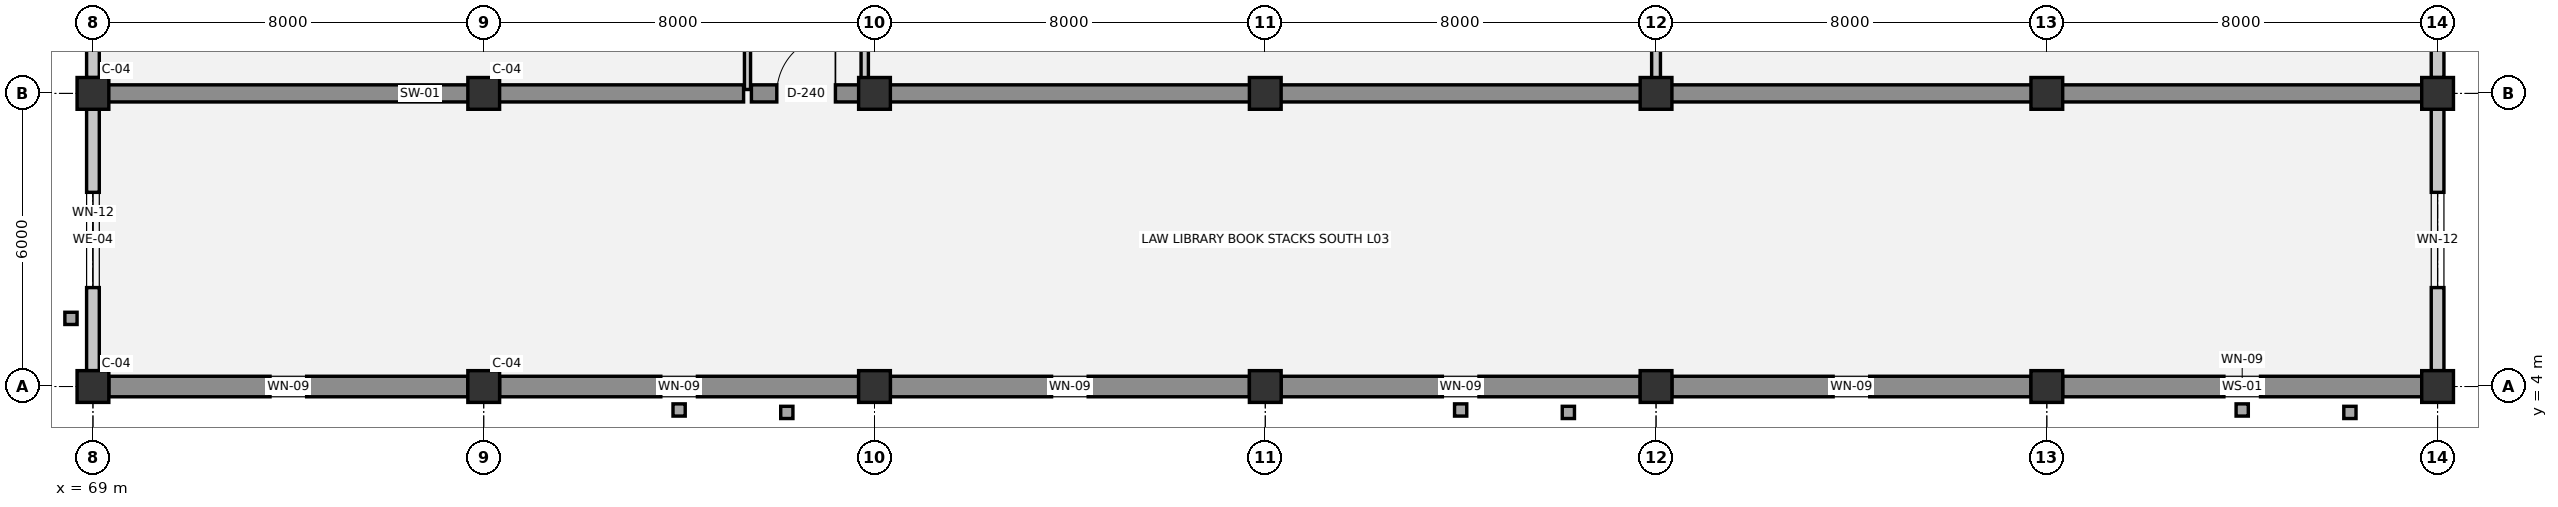
"""IFC4 building model, lengths in metres.
Left out: names, types, materials, properties, quantities, classifications, styles, units other than length and angle.
Written with IfcOpenShell. Run it as: python <this file> out.ifc"""

import sys

from ifc_helpers import new_model, si_unit, direction, frame, frame_2d, origin, origin_2d, place, context, subcontext, project, spatial, rectangle, extrude, element, fill, save


model = new_model("IFC4")
c1 = context("Model", 3, precision=1e-05, world=origin(), true_north=direction((0.0, 1.0)))
c2 = subcontext(c1, "Body", "Model", "MODEL_VIEW")
j1 = project(units=[si_unit("LENGTHUNIT", "METRE"), si_unit("PLANEANGLEUNIT", "RADIAN")], contexts=[c1])
p1 = place(None, origin())
s1 = spatial("IfcSite", under=j1, at=p1, CompositionType="ELEMENT")
p2 = place(p1, origin())
s2 = spatial("IfcBuilding", under=s1, at=p2, CompositionType="ELEMENT")
p3 = place(p2, frame((0.0, 0.0, 9.9)))
s3 = spatial("IfcBuildingStorey", under=s2, at=p3, CompositionType="ELEMENT", Elevation=9.9)
for number, where, z_axis, x_axis in (
    (1, (69.0, 4.0, 0.0), (0.0, 0.0, 1.0), (1.0, 0.0, 0.0)),
    (2, (69.0, 10.0, 0.0), (0.0, 0.0, 1.0), (1.0, 0.0, 0.0)),
    (3, (77.0, 4.0, 0.0), (0.0, 0.0, 1.0), (1.0, 0.0, 0.0)),
    (4, (77.0, 10.0, 0.0), (0.0, 0.0, 1.0), (1.0, 0.0, 0.0)),
    (5, (85.0, 4.0, 0.0), (0.0, 0.0, 1.0), (1.0, 0.0, 0.0)),
    (6, (85.0, 10.0, 0.0), (0.0, 0.0, 1.0), (1.0, 0.0, 0.0)),
    (7, (93.0, 4.0, 0.0), (0.0, 0.0, 1.0), (1.0, 0.0, 0.0)),
    (8, (93.0, 10.0, 0.0), (0.0, 0.0, 1.0), (1.0, 0.0, 0.0)),
    (9, (101.0, 4.0, 0.0), (0.0, 0.0, 1.0), (1.0, 0.0, 0.0)),
    (10, (101.0, 10.0, 0.0), (0.0, 0.0, 1.0), (1.0, 0.0, 0.0)),
    (11, (109.0, 4.0, 0.0), (0.0, 0.0, 1.0), (1.0, 0.0, 0.0)),
    (12, (109.0, 10.0, 0.0), (0.0, 0.0, 1.0), (1.0, 0.0, 0.0)),
    (13, (117.0, 4.0, 0.0), (0.0, 0.0, 1.0), (1.0, 0.0, 0.0)),
    (14, (117.0, 10.0, 0.0), (0.0, 0.0, 1.0), (1.0, 0.0, 0.0)),
):
    element("IfcColumn", number, at=place(p3, frame(where, z_axis=z_axis, x_axis=x_axis)), inside=s3, PredefinedType="COLUMN", context=c2, shape_type="SweptSolid", body=[
        extrude(rectangle(XDim=0.65, YDim=0.65, at=origin_2d()), origin(), (0.0, 0.0, 1.0), 4.5),
    ])
p4 = place(p3, frame((69.0, 4.325, 0.0), z_axis=(0.0, 0.0, 1.0), x_axis=(0.0, 1.0, 0.0)))
e15 = element("IfcWall", 15, at=p4, inside=s3, PredefinedType="SOLIDWALL", context=c2, shape_type="SweptSolid", body=[
    extrude(rectangle(XDim=5.35, YDim=0.26, at=frame_2d((2.675, 0.0))), origin(), (0.0, 0.0, 1.0), 3.44),
])
p5 = place(p4, frame((1.7, 0.0, 0.9)))
e16 = element("IfcOpeningElement", 16, at=p5, cuts=e15, PredefinedType="OPENING", context=c2, shape_type="SweptSolid", body=[
    extrude(rectangle(XDim=1.95, YDim=1.85, at=frame_2d((0.975, 0.925))), frame((0.0, 0.14, 0.0), z_axis=(0.0, -1.0, 0.0), x_axis=(1.0, 0.0, 0.0)), (0.0, 0.0, 1.0), 0.28),
])
p6 = place(p3, frame((69.0, 10.325, 0.0), z_axis=(0.0, 0.0, 1.0), x_axis=(0.0, 1.0, 0.0)))
e17 = element("IfcWall", 17, at=p6, inside=s3, PredefinedType="SOLIDWALL", context=c2, shape_type="SweptSolid", body=[
    extrude(rectangle(XDim=6.35, YDim=0.26, at=frame_2d((3.175, 0.0))), origin(), (0.0, 0.0, 1.0), 3.44),
])
p7 = place(p6, frame((2.75, 0.0, 0.0)))
e18 = element("IfcOpeningElement", 18, at=p7, cuts=e17, PredefinedType="OPENING", context=c2, shape_type="SweptSolid", body=[
    extrude(rectangle(XDim=1.65, YDim=2.2, at=frame_2d((0.825, 1.1))), frame((0.0, 0.14, 0.0), z_axis=(0.0, -1.0, 0.0), x_axis=(1.0, 0.0, 0.0)), (0.0, 0.0, 1.0), 0.28),
])
p8 = place(p3, frame((117.0, 16.675, 0.0), z_axis=(0.0, 0.0, 1.0), x_axis=(0.0, -1.0, 0.0)))
e19 = element("IfcWall", 19, at=p8, inside=s3, PredefinedType="SOLIDWALL", context=c2, shape_type="SweptSolid", body=[
    extrude(rectangle(XDim=6.35, YDim=0.26, at=frame_2d((3.175, 0.0))), origin(), (0.0, 0.0, 1.0), 3.44),
])
p9 = place(p8, frame((2.075, 0.0, 0.9)))
e20 = element("IfcOpeningElement", 20, at=p9, cuts=e19, PredefinedType="OPENING", context=c2, shape_type="SweptSolid", body=[
    extrude(rectangle(XDim=2.2, YDim=1.9, at=frame_2d((1.1, 0.95))), frame((0.0, 0.14, 0.0), z_axis=(0.0, -1.0, 0.0), x_axis=(1.0, 0.0, 0.0)), (0.0, 0.0, 1.0), 0.28),
])
p10 = place(p3, frame((117.0, 9.675, 0.0), z_axis=(0.0, 0.0, 1.0), x_axis=(0.0, -1.0, 0.0)))
e21 = element("IfcWall", 21, at=p10, inside=s3, PredefinedType="SOLIDWALL", context=c2, shape_type="SweptSolid", body=[
    extrude(rectangle(XDim=5.35, YDim=0.26, at=frame_2d((2.675, 0.0))), origin(), (0.0, 0.0, 1.0), 3.44),
])
p11 = place(p10, frame((1.7, 0.0, 0.9)))
e22 = element("IfcOpeningElement", 22, at=p11, cuts=e21, PredefinedType="OPENING", context=c2, shape_type="SweptSolid", body=[
    extrude(rectangle(XDim=1.95, YDim=1.85, at=frame_2d((0.975, 0.925))), frame((0.0, 0.14, 0.0), z_axis=(0.0, -1.0, 0.0), x_axis=(1.0, 0.0, 0.0)), (0.0, 0.0, 1.0), 0.28),
])
p12 = place(p3, frame((116.675, 4.0, 0.0), z_axis=(0.0, 0.0, 1.0), x_axis=(-1.0, 0.0, 0.0)))
e23 = element("IfcWall", 23, at=p12, inside=s3, PredefinedType="SOLIDWALL", context=c2, shape_type="SweptSolid", body=[
    extrude(rectangle(XDim=7.35, YDim=0.42, at=frame_2d((3.675, 0.0))), origin(), (0.0, 0.0, 1.0), 3.44),
])
p13 = place(p12, frame((3.3, 0.0, 0.9)))
e24 = element("IfcOpeningElement", 24, at=p13, cuts=e23, PredefinedType="OPENING", context=c2, shape_type="SweptSolid", body=[
    extrude(rectangle(XDim=0.75, YDim=2.2, at=frame_2d((0.375, 1.1))), frame((0.0, 0.22, 0.0), z_axis=(0.0, -1.0, 0.0), x_axis=(1.0, 0.0, 0.0)), (0.0, 0.0, 1.0), 0.44),
])
p14 = place(p3, frame((108.675, 4.0, 0.0), z_axis=(0.0, 0.0, 1.0), x_axis=(-1.0, 0.0, 0.0)))
e25 = element("IfcWall", 25, at=p14, inside=s3, PredefinedType="SOLIDWALL", context=c2, shape_type="SweptSolid", body=[
    extrude(rectangle(XDim=7.35, YDim=0.42, at=frame_2d((3.675, 0.0))), origin(), (0.0, 0.0, 1.0), 3.44),
])
p15 = place(p14, frame((3.3, 0.0, 0.9)))
e26 = element("IfcOpeningElement", 26, at=p15, cuts=e25, PredefinedType="OPENING", context=c2, shape_type="SweptSolid", body=[
    extrude(rectangle(XDim=0.75, YDim=2.2, at=frame_2d((0.375, 1.1))), frame((0.0, 0.22, 0.0), z_axis=(0.0, -1.0, 0.0), x_axis=(1.0, 0.0, 0.0)), (0.0, 0.0, 1.0), 0.44),
])
p16 = place(p3, frame((100.675, 4.0, 0.0), z_axis=(0.0, 0.0, 1.0), x_axis=(-1.0, 0.0, 0.0)))
e27 = element("IfcWall", 27, at=p16, inside=s3, PredefinedType="SOLIDWALL", context=c2, shape_type="SweptSolid", body=[
    extrude(rectangle(XDim=7.35, YDim=0.42, at=frame_2d((3.675, 0.0))), origin(), (0.0, 0.0, 1.0), 3.44),
])
p17 = place(p16, frame((3.3, 0.0, 0.9)))
e28 = element("IfcOpeningElement", 28, at=p17, cuts=e27, PredefinedType="OPENING", context=c2, shape_type="SweptSolid", body=[
    extrude(rectangle(XDim=0.75, YDim=2.2, at=frame_2d((0.375, 1.1))), frame((0.0, 0.22, 0.0), z_axis=(0.0, -1.0, 0.0), x_axis=(1.0, 0.0, 0.0)), (0.0, 0.0, 1.0), 0.44),
])
p18 = place(p3, frame((92.675, 4.0, 0.0), z_axis=(0.0, 0.0, 1.0), x_axis=(-1.0, 0.0, 0.0)))
e29 = element("IfcWall", 29, at=p18, inside=s3, PredefinedType="SOLIDWALL", context=c2, shape_type="SweptSolid", body=[
    extrude(rectangle(XDim=7.35, YDim=0.42, at=frame_2d((3.675, 0.0))), origin(), (0.0, 0.0, 1.0), 3.44),
])
p19 = place(p18, frame((3.3, 0.0, 0.9)))
e30 = element("IfcOpeningElement", 30, at=p19, cuts=e29, PredefinedType="OPENING", context=c2, shape_type="SweptSolid", body=[
    extrude(rectangle(XDim=0.75, YDim=2.2, at=frame_2d((0.375, 1.1))), frame((0.0, 0.22, 0.0), z_axis=(0.0, -1.0, 0.0), x_axis=(1.0, 0.0, 0.0)), (0.0, 0.0, 1.0), 0.44),
])
p20 = place(p3, frame((84.675, 4.0, 0.0), z_axis=(0.0, 0.0, 1.0), x_axis=(-1.0, 0.0, 0.0)))
e31 = element("IfcWall", 31, at=p20, inside=s3, PredefinedType="SOLIDWALL", context=c2, shape_type="SweptSolid", body=[
    extrude(rectangle(XDim=7.35, YDim=0.42, at=frame_2d((3.675, 0.0))), origin(), (0.0, 0.0, 1.0), 3.44),
])
p21 = place(p20, frame((3.3, 0.0, 0.9)))
e32 = element("IfcOpeningElement", 32, at=p21, cuts=e31, PredefinedType="OPENING", context=c2, shape_type="SweptSolid", body=[
    extrude(rectangle(XDim=0.75, YDim=2.2, at=frame_2d((0.375, 1.1))), frame((0.0, 0.22, 0.0), z_axis=(0.0, -1.0, 0.0), x_axis=(1.0, 0.0, 0.0)), (0.0, 0.0, 1.0), 0.44),
])
p22 = place(p3, frame((76.675, 4.0, 0.0), z_axis=(0.0, 0.0, 1.0), x_axis=(-1.0, 0.0, 0.0)))
e33 = element("IfcWall", 33, at=p22, inside=s3, PredefinedType="SOLIDWALL", context=c2, shape_type="SweptSolid", body=[
    extrude(rectangle(XDim=7.35, YDim=0.42, at=frame_2d((3.675, 0.0))), origin(), (0.0, 0.0, 1.0), 3.44),
])
p23 = place(p22, frame((3.3, 0.0, 0.9)))
e34 = element("IfcOpeningElement", 34, at=p23, cuts=e33, PredefinedType="OPENING", context=c2, shape_type="SweptSolid", body=[
    extrude(rectangle(XDim=0.75, YDim=2.2, at=frame_2d((0.375, 1.1))), frame((0.0, 0.22, 0.0), z_axis=(0.0, -1.0, 0.0), x_axis=(1.0, 0.0, 0.0)), (0.0, 0.0, 1.0), 0.44),
])
p24 = place(p3, frame((69.08, 10.0, 0.0), z_axis=(0.0, 0.0, 1.0), x_axis=(1.0, 0.0, 0.0)))
e35 = element("IfcWall", 35, at=p24, inside=s3, PredefinedType="SHEAR", context=c2, shape_type="SweptSolid", body=[
    extrude(rectangle(XDim=13.24, YDim=0.35, at=frame_2d((6.62, 0.0))), origin(), (0.0, 0.0, 1.0), 4.14),
])
p25 = place(p3, frame((82.48, 10.0, 0.0), z_axis=(0.0, 0.0, 1.0), x_axis=(1.0, 0.0, 0.0)))
e36 = element("IfcWall", 36, at=p25, inside=s3, PredefinedType="SHEAR", context=c2, shape_type="SweptSolid", body=[
    extrude(rectangle(XDim=2.24, YDim=0.35, at=frame_2d((1.12, 0.0))), origin(), (0.0, 0.0, 1.0), 4.14),
])
p26 = place(p25, frame((0.52, 0.0, 0.0)))
e37 = element("IfcOpeningElement", 37, at=p26, cuts=e36, PredefinedType="OPENING", context=c2, shape_type="SweptSolid", body=[
    extrude(rectangle(XDim=1.2, YDim=2.15, at=frame_2d((0.6, 1.075))), frame((0.0, 0.185, 0.0), z_axis=(0.0, -1.0, 0.0), x_axis=(1.0, 0.0, 0.0)), (0.0, 0.0, 1.0), 0.37),
])
p27 = place(p3, frame((84.88, 10.0, 0.0), z_axis=(0.0, 0.0, 1.0), x_axis=(1.0, 0.0, 0.0)))
e38 = element("IfcWall", 38, at=p27, inside=s3, PredefinedType="SHEAR", context=c2, shape_type="SweptSolid", body=[
    extrude(rectangle(XDim=16.04, YDim=0.35, at=frame_2d((8.02, 0.0))), origin(), (0.0, 0.0, 1.0), 4.14),
])
p28 = place(p3, frame((101.08, 10.0, 0.0), z_axis=(0.0, 0.0, 1.0), x_axis=(1.0, 0.0, 0.0)))
e39 = element("IfcWall", 39, at=p28, inside=s3, PredefinedType="SHEAR", context=c2, shape_type="SweptSolid", body=[
    extrude(rectangle(XDim=15.84, YDim=0.35, at=frame_2d((7.92, 0.0))), origin(), (0.0, 0.0, 1.0), 4.14),
])
p29 = place(p3, frame((82.4, 10.08, 0.0), z_axis=(0.0, 0.0, 1.0), x_axis=(0.0, 1.0, 0.0)))
e40 = element("IfcWall", 40, at=p29, inside=s3, PredefinedType="PARTITIONING", context=c2, shape_type="SweptSolid", body=[
    extrude(rectangle(XDim=14.84, YDim=0.125, at=frame_2d((7.42, 0.0))), origin(), (0.0, 0.0, 1.0), 4.14),
])
p30 = place(p29, frame((6.545, 0.0, 0.0)))
e41 = element("IfcOpeningElement", 41, at=p30, cuts=e40, PredefinedType="OPENING", context=c2, shape_type="SweptSolid", body=[
    extrude(rectangle(XDim=1.75, YDim=2.3, at=frame_2d((0.875, 1.15))), frame((0.0, 0.073, 0.0), z_axis=(0.0, -1.0, 0.0), x_axis=(1.0, 0.0, 0.0)), (0.0, 0.0, 1.0), 0.145),
])
p31 = place(p3, frame((84.8, 10.08, 0.0), z_axis=(0.0, 0.0, 1.0), x_axis=(0.0, 1.0, 0.0)))
e42 = element("IfcWall", 42, at=p31, inside=s3, PredefinedType="PARTITIONING", context=c2, shape_type="SweptSolid", body=[
    extrude(rectangle(XDim=14.84, YDim=0.15, at=frame_2d((7.42, 0.0))), origin(), (0.0, 0.0, 1.0), 3.61),
])
p32 = place(p31, frame((2.495, 0.0, 0.0)))
e43 = element("IfcOpeningElement", 43, at=p32, cuts=e42, PredefinedType="OPENING", context=c2, shape_type="SweptSolid", body=[
    extrude(rectangle(XDim=1.85, YDim=2.3, at=frame_2d((0.925, 1.15))), frame((0.0, 0.085, 0.0), z_axis=(0.0, -1.0, 0.0), x_axis=(1.0, 0.0, 0.0)), (0.0, 0.0, 1.0), 0.17),
])
p33 = place(p3, frame((101.0, 10.08, 0.0), z_axis=(0.0, 0.0, 1.0), x_axis=(0.0, 1.0, 0.0)))
e44 = element("IfcWall", 44, at=p33, inside=s3, PredefinedType="PARTITIONING", context=c2, shape_type="SweptSolid", body=[
    extrude(rectangle(XDim=14.84, YDim=0.18, at=frame_2d((7.42, 0.0))), origin(), (0.0, 0.0, 1.0), 3.61),
])
p34 = place(p5, origin())
e45 = element("IfcWindow", 45, at=p34, inside=s3, PartitioningType="SINGLE_PANEL", PredefinedType="WINDOW", context=c2, shape_type="SweptSolid", body=[
    extrude(rectangle(XDim=1.95, YDim=1.85, at=frame_2d((0.975, 0.925))), frame((0.0, 0.03, 0.0), z_axis=(0.0, -1.0, 0.0), x_axis=(1.0, 0.0, 0.0)), (0.0, 0.0, 1.0), 0.06),
])
fill(e16, e45)
p35 = place(p11, origin())
e46 = element("IfcWindow", 46, at=p35, inside=s3, PartitioningType="SINGLE_PANEL", PredefinedType="WINDOW", context=c2, shape_type="SweptSolid", body=[
    extrude(rectangle(XDim=1.95, YDim=1.85, at=frame_2d((0.975, 0.925))), frame((0.0, 0.03, 0.0), z_axis=(0.0, -1.0, 0.0), x_axis=(1.0, 0.0, 0.0)), (0.0, 0.0, 1.0), 0.06),
])
fill(e22, e46)
p36 = place(p13, origin())
e47 = element("IfcWindow", 47, at=p36, inside=s3, PartitioningType="SINGLE_PANEL", PredefinedType="WINDOW", context=c2, shape_type="SweptSolid", body=[
    extrude(rectangle(XDim=0.75, YDim=2.2, at=frame_2d((0.375, 1.1))), frame((0.0, 0.03, 0.0), z_axis=(0.0, -1.0, 0.0), x_axis=(1.0, 0.0, 0.0)), (0.0, 0.0, 1.0), 0.06),
])
fill(e24, e47)
p37 = place(p15, origin())
e48 = element("IfcWindow", 48, at=p37, inside=s3, PartitioningType="SINGLE_PANEL", PredefinedType="WINDOW", context=c2, shape_type="SweptSolid", body=[
    extrude(rectangle(XDim=0.75, YDim=2.2, at=frame_2d((0.375, 1.1))), frame((0.0, 0.03, 0.0), z_axis=(0.0, -1.0, 0.0), x_axis=(1.0, 0.0, 0.0)), (0.0, 0.0, 1.0), 0.06),
])
fill(e26, e48)
p38 = place(p17, origin())
e49 = element("IfcWindow", 49, at=p38, inside=s3, PartitioningType="SINGLE_PANEL", PredefinedType="WINDOW", context=c2, shape_type="SweptSolid", body=[
    extrude(rectangle(XDim=0.75, YDim=2.2, at=frame_2d((0.375, 1.1))), frame((0.0, 0.03, 0.0), z_axis=(0.0, -1.0, 0.0), x_axis=(1.0, 0.0, 0.0)), (0.0, 0.0, 1.0), 0.06),
])
fill(e28, e49)
p39 = place(p19, origin())
e50 = element("IfcWindow", 50, at=p39, inside=s3, PartitioningType="SINGLE_PANEL", PredefinedType="WINDOW", context=c2, shape_type="SweptSolid", body=[
    extrude(rectangle(XDim=0.75, YDim=2.2, at=frame_2d((0.375, 1.1))), frame((0.0, 0.03, 0.0), z_axis=(0.0, -1.0, 0.0), x_axis=(1.0, 0.0, 0.0)), (0.0, 0.0, 1.0), 0.06),
])
fill(e30, e50)
p40 = place(p21, origin())
e51 = element("IfcWindow", 51, at=p40, inside=s3, PartitioningType="SINGLE_PANEL", PredefinedType="WINDOW", context=c2, shape_type="SweptSolid", body=[
    extrude(rectangle(XDim=0.75, YDim=2.2, at=frame_2d((0.375, 1.1))), frame((0.0, 0.03, 0.0), z_axis=(0.0, -1.0, 0.0), x_axis=(1.0, 0.0, 0.0)), (0.0, 0.0, 1.0), 0.06),
])
fill(e32, e51)
p41 = place(p23, origin())
e52 = element("IfcWindow", 52, at=p41, inside=s3, PartitioningType="SINGLE_PANEL", PredefinedType="WINDOW", context=c2, shape_type="SweptSolid", body=[
    extrude(rectangle(XDim=0.75, YDim=2.2, at=frame_2d((0.375, 1.1))), frame((0.0, 0.03, 0.0), z_axis=(0.0, -1.0, 0.0), x_axis=(1.0, 0.0, 0.0)), (0.0, 0.0, 1.0), 0.06),
])
fill(e34, e52)
p42 = place(p26, origin())
e53 = element("IfcDoor", 53, at=p42, inside=s3, OperationType="SINGLE_SWING_RIGHT", PredefinedType="DOOR", context=c2, shape_type="SweptSolid", body=[
    extrude(rectangle(XDim=1.2, YDim=2.15, at=frame_2d((0.6, 1.075))), frame((0.0, 0.025, 0.0), z_axis=(0.0, -1.0, 0.0), x_axis=(1.0, 0.0, 0.0)), (0.0, 0.0, 1.0), 0.05),
])
fill(e37, e53)
save(model, sys.argv[1])
